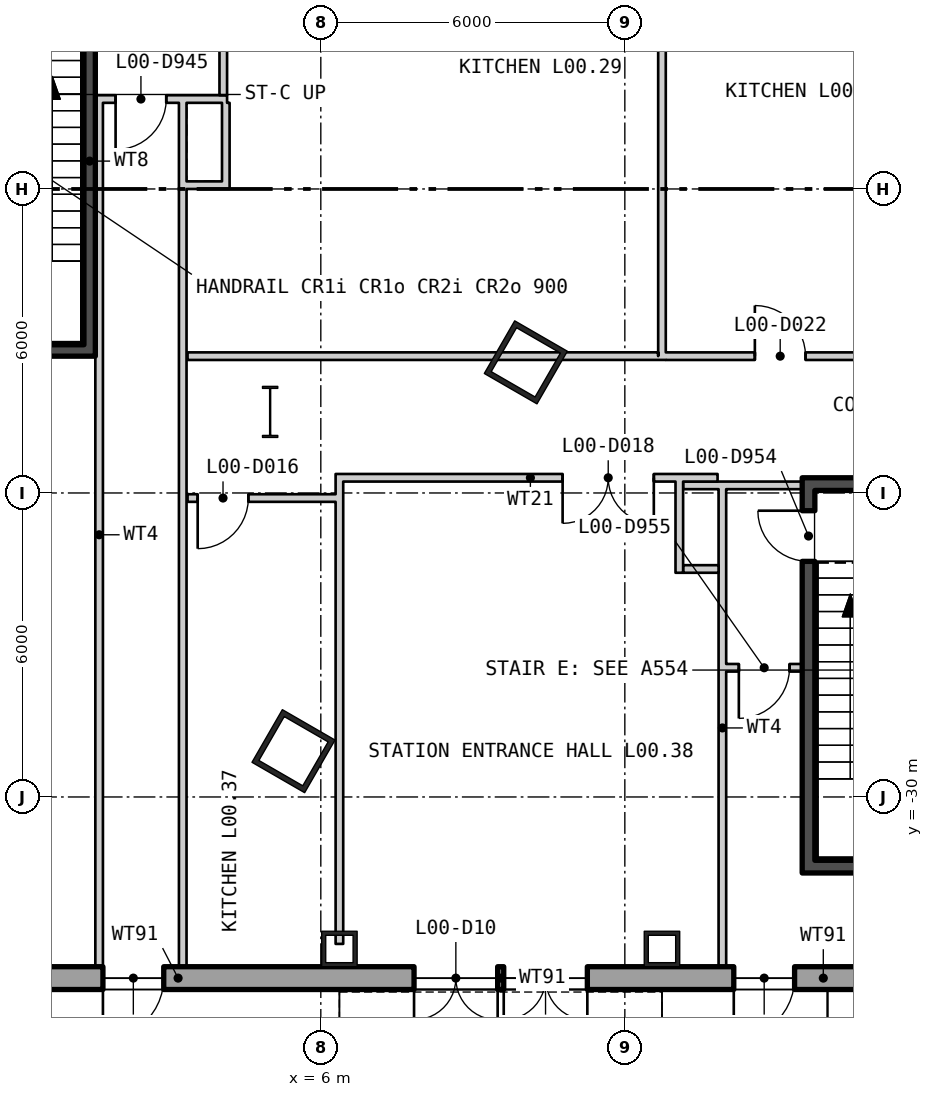
"""IFC4 building model, lengths in metres.
Left out: names, types, materials, properties, quantities, classifications, styles, units other than length and angle.
Written with IfcOpenShell. Run it as: python <this file> out.ifc"""

import sys

from ifc_helpers import new_model, si_unit, direction, frame, frame_2d, origin, origin_2d, place, context, subcontext, project, spatial, polyline, rectangle, hollow_rectangle, i_section, outline, extrude, element, fill, save


model = new_model("IFC4")
c1 = context("Model", 3, precision=1e-05, world=origin(), true_north=direction((0.0, 1.0)))
c2 = subcontext(c1, "Body", "Model", "MODEL_VIEW")
j1 = project(units=[si_unit("LENGTHUNIT", "METRE"), si_unit("PLANEANGLEUNIT", "RADIAN")], contexts=[c1])
p1 = place(None, origin())
s1 = spatial("IfcSite", under=j1, at=p1, CompositionType="ELEMENT")
p2 = place(p1, origin())
s2 = spatial("IfcBuilding", under=s1, at=p2, CompositionType="ELEMENT")
p3 = place(p2, origin())
s3 = spatial("IfcBuildingStorey", under=s2, at=p3, CompositionType="ELEMENT", Elevation=0.0)
for number, where, z_axis, x_axis in (
    (1, (5.461, -29.096, 0.0), (0.0, 0.0, 1.0), (0.5, 0.866, 0.0)),
    (2, (10.046, -21.422, 0.0), (0.0, 0.0, 1.0), (0.5, 0.866, 0.0)),
):
    element("IfcColumn", number, at=place(p3, frame(where, z_axis=z_axis, x_axis=x_axis)), inside=s3, PredefinedType="COLUMN", context=c2, shape_type="SweptSolid", body=[
        extrude(hollow_rectangle(XDim=1.2, YDim=1.2, WallThickness=0.1, at=origin_2d()), origin(), (0.0, 0.0, 1.0), 8.4),
    ])
p4 = place(p3, frame((5.0, -22.4, 0.0), z_axis=(0.0, 0.0, 1.0), x_axis=(1.0, 0.0, 0.0)))
e3 = element("IfcColumn", 3, at=p4, inside=s3, PredefinedType="COLUMN", context=c2, shape_type="SweptSolid", body=[
    extrude(i_section(OverallWidth=0.302, OverallDepth=1.008, WebThickness=0.021, FlangeThickness=0.04, at=origin_2d()), origin(), (0.0, 0.0, 1.0), 8.4),
])
for number, where, z_axis, x_axis in (
    (4, (6.367, -33.0, 0.0), (0.0, 0.0, 1.0), (1.0, 0.0, 0.0)),
    (5, (12.733, -33.0, 0.0), (0.0, 0.0, 1.0), (1.0, 0.0, 0.0)),
):
    element("IfcColumn", number, at=place(p3, frame(where, z_axis=z_axis, x_axis=x_axis)), inside=s3, PredefinedType="COLUMN", context=c2, shape_type="SweptSolid", body=[
        extrude(hollow_rectangle(XDim=0.7, YDim=0.7, WallThickness=0.08, at=origin_2d()), origin(), (0.0, 0.0, 1.0), 8.4),
    ])
p5 = place(p3, frame((-38.775, -33.575, 5.4), z_axis=(0.0, 0.0, 1.0), x_axis=(1.0, 0.0, 0.0)))
e6 = element("IfcWall", 6, at=p5, inside=s3, PredefinedType="SOLIDWALL", context=c2, shape_type="SweptSolid", body=[
    extrude(outline(polyline([(-0.225, -0.225), (77.775, -0.225), (77.325, 0.225), (0.225, 0.225), (-0.225, -0.225)])), origin(), (0.0, 0.0, 1.0), 2.6),
])
for number, where, z_axis, x_axis in (
    (7, (5.767, -33.575, -0.4), (0.0, 0.0, 1.0), (1.0, 0.0, 0.0)),
    (8, (12.133, -33.575, -0.4), (0.0, 0.0, 1.0), (1.0, 0.0, 0.0)),
):
    element("IfcWall", number, at=place(p3, frame(where, z_axis=z_axis, x_axis=x_axis)), inside=s3, PredefinedType="SOLIDWALL", context=c2, shape_type="SweptSolid", body=[
        extrude(outline(polyline([(0.0, -0.225), (1.2, -0.225), (1.2, 0.225), (0.0, 0.225), (0.0, -0.225)])), origin(), (0.0, 0.0, 1.0), 5.51),
    ])
p6 = place(p3, frame((0.6, -33.575, -0.4), z_axis=(0.0, 0.0, 1.0), x_axis=(1.0, 0.0, 0.0)))
e9 = element("IfcWall", 9, at=p6, inside=s3, PredefinedType="SOLIDWALL", context=c2, shape_type="SweptSolid", body=[
    extrude(outline(polyline([(0.0, -0.225), (5.167, -0.225), (5.167, 0.225), (0.0, 0.225), (0.0, -0.225)])), origin(), (0.0, 0.0, 1.0), 5.8),
])
p7 = place(p6, frame((1.1, 0.0, 0.4)))
e10 = element("IfcOpeningElement", 10, at=p7, cuts=e9, PredefinedType="OPENING", context=c2, shape_type="SweptSolid", body=[
    extrude(rectangle(XDim=1.2, YDim=2.4, at=frame_2d((0.6, 1.2))), frame((0.0, 0.235, 0.0), z_axis=(0.0, -1.0, 0.0), x_axis=(1.0, 0.0, 0.0)), (0.0, 0.0, 1.0), 0.47),
])
p8 = place(p3, frame((6.967, -33.575, -0.4), z_axis=(0.0, 0.0, 1.0), x_axis=(1.0, 0.0, 0.0)))
e11 = element("IfcWall", 11, at=p8, inside=s3, PredefinedType="SOLIDWALL", context=c2, shape_type="SweptSolid", body=[
    extrude(outline(polyline([(0.0, -0.225), (5.167, -0.225), (5.167, 0.225), (0.0, 0.225), (0.0, -0.225)])), origin(), (0.0, 0.0, 1.0), 5.8),
])
p9 = place(p8, frame((0.873, 0.0, 0.4)))
e12 = element("IfcOpeningElement", 12, at=p9, cuts=e11, PredefinedType="OPENING", context=c2, shape_type="SweptSolid", body=[
    extrude(rectangle(XDim=1.65, YDim=3.0, at=frame_2d((0.825, 1.5))), frame((0.0, 0.235, 0.0), z_axis=(0.0, -1.0, 0.0), x_axis=(1.0, 0.0, 0.0)), (0.0, 0.0, 1.0), 0.47),
])
p10 = place(p8, frame((2.643, 0.0, 0.4)))
e13 = element("IfcOpeningElement", 13, at=p10, cuts=e11, PredefinedType="OPENING", context=c2, shape_type="SweptSolid", body=[
    extrude(rectangle(XDim=1.65, YDim=3.0, at=frame_2d((0.825, 1.5))), frame((0.0, 0.235, 0.0), z_axis=(0.0, -1.0, 0.0), x_axis=(1.0, 0.0, 0.0)), (0.0, 0.0, 1.0), 0.47),
])
p11 = place(p3, frame((13.333, -33.575, -0.4), z_axis=(0.0, 0.0, 1.0), x_axis=(1.0, 0.0, 0.0)))
e14 = element("IfcWall", 14, at=p11, inside=s3, PredefinedType="SOLIDWALL", context=c2, shape_type="SweptSolid", body=[
    extrude(outline(polyline([(0.0, -0.225), (5.167, -0.225), (5.167, 0.225), (0.0, 0.225), (0.0, -0.225)])), origin(), (0.0, 0.0, 1.0), 5.8),
])
p12 = place(p11, frame((0.817, 0.0, 0.4)))
e15 = element("IfcOpeningElement", 15, at=p12, cuts=e14, PredefinedType="OPENING", context=c2, shape_type="SweptSolid", body=[
    extrude(rectangle(XDim=1.2, YDim=2.4, at=frame_2d((0.6, 1.2))), frame((0.0, 0.235, 0.0), z_axis=(0.0, -1.0, 0.0), x_axis=(1.0, 0.0, 0.0)), (0.0, 0.0, 1.0), 0.47),
])
p13 = place(p3, frame((1.438, -21.075, 0.0), z_axis=(0.0, 0.0, 1.0), x_axis=(0.0, 1.0, 0.0)))
e16 = element("IfcWall", 16, at=p13, inside=s3, PredefinedType="SHEAR", context=c2, shape_type="SweptSolid", body=[
    extrude(rectangle(XDim=7.25, YDim=0.225, at=frame_2d((3.625, 0.0))), origin(), (0.0, 0.0, 1.0), 8.18),
])
p14 = place(p13, frame((5.94, 0.0, 0.0)))
e17 = element("IfcOpeningElement", 17, at=p14, cuts=e16, PredefinedType="OPENING", context=c2, shape_type="SweptSolid", body=[
    extrude(rectangle(XDim=1.0, YDim=2.1, at=frame_2d((0.5, 1.05))), frame((0.0, 0.122, 0.0), z_axis=(0.0, -1.0, 0.0), x_axis=(1.0, 0.0, 0.0)), (0.0, 0.0, 1.0), 0.245),
])
p15 = place(p3, frame((-1.55, -21.188, 0.0), z_axis=(0.0, 0.0, 1.0), x_axis=(1.0, 0.0, 0.0)))
e18 = element("IfcWall", 18, at=p15, inside=s3, PredefinedType="SHEAR", context=c2, shape_type="SweptSolid", body=[
    extrude(rectangle(XDim=3.1, YDim=0.225, at=frame_2d((1.55, 0.0))), origin(), (0.0, 0.0, 1.0), 8.18),
])
p16 = place(p3, frame((1.55, -16.225, 0.0), z_axis=(0.0, 0.0, 1.0), x_axis=(1.0, 0.0, 0.0)))
e19 = element("IfcWall", 19, at=p16, inside=s3, PredefinedType="PARTITIONING", context=c2, shape_type="SweptSolid", body=[
    extrude(rectangle(XDim=2.6, YDim=0.15, at=frame_2d((1.3, 0.0))), origin(), (0.0, 0.0, 1.0), 8.18),
])
p17 = place(p16, frame((0.4, 0.0, 0.0)))
e20 = element("IfcOpeningElement", 20, at=p17, cuts=e19, PredefinedType="OPENING", context=c2, shape_type="SweptSolid", body=[
    extrude(rectangle(XDim=1.0, YDim=2.4, at=frame_2d((0.5, 1.2))), frame((0.0, 0.085, 0.0), z_axis=(0.0, -1.0, 0.0), x_axis=(1.0, 0.0, 0.0)), (0.0, 0.0, 1.0), 0.17),
])
p18 = place(p3, frame((4.075, -16.15, 0.0), z_axis=(0.0, 0.0, 1.0), x_axis=(0.0, 1.0, 0.0)))
e21 = element("IfcWall", 21, at=p18, inside=s3, PredefinedType="PARTITIONING", context=c2, shape_type="SweptSolid", body=[
    extrude(rectangle(XDim=2.4, YDim=0.15, at=frame_2d((1.2, 0.0))), origin(), (0.0, 0.0, 1.0), 8.18),
])
p19 = place(p3, frame((3.35, -17.925, 0.0), z_axis=(0.0, 0.0, 1.0), x_axis=(1.0, 0.0, 0.0)))
e22 = element("IfcWall", 22, at=p19, inside=s3, PredefinedType="PARTITIONING", context=c2, shape_type="SweptSolid", body=[
    extrude(rectangle(XDim=0.7, YDim=0.15, at=frame_2d((0.35, 0.0))), origin(), (0.0, 0.0, 1.0), 8.18),
])
p20 = place(p3, frame((4.125, -18.0, 0.0), z_axis=(0.0, 0.0, 1.0), x_axis=(0.0, 1.0, 0.0)))
e23 = element("IfcWall", 23, at=p20, inside=s3, PredefinedType="PARTITIONING", context=c2, shape_type="SweptSolid", body=[
    extrude(rectangle(XDim=1.7, YDim=0.15, at=frame_2d((0.85, 0.0))), origin(), (0.0, 0.0, 1.0), 8.18),
])
p21 = place(p3, frame((1.625, -33.35, 0.0), z_axis=(0.0, 0.0, 1.0), x_axis=(0.0, 1.0, 0.0)))
e24 = element("IfcWall", 24, at=p21, inside=s3, PredefinedType="PARTITIONING", context=c2, shape_type="SweptSolid", body=[
    extrude(rectangle(XDim=17.05, YDim=0.15, at=frame_2d((8.525, 0.0))), origin(), (0.0, 0.0, 1.0), 8.18),
])
p22 = place(p3, frame((3.275, -33.35, 0.0), z_axis=(0.0, 0.0, 1.0), x_axis=(0.0, 1.0, 0.0)))
e25 = element("IfcWall", 25, at=p22, inside=s3, PredefinedType="PARTITIONING", context=c2, shape_type="SweptSolid", body=[
    extrude(rectangle(XDim=0.45, YDim=0.15, at=frame_2d((0.225, 0.0))), origin(), (0.0, 0.0, 1.0), 8.18),
])
p23 = place(p3, frame((3.275, -32.9, 0.0), z_axis=(0.0, 0.0, 1.0), x_axis=(0.0, 1.0, 0.0)))
e26 = element("IfcWall", 26, at=p23, inside=s3, PredefinedType="PARTITIONING", context=c2, shape_type="SweptSolid", body=[
    extrude(rectangle(XDim=16.6, YDim=0.15, at=frame_2d((8.3, 0.0))), origin(), (0.0, 0.0, 1.0), 7.58),
])
p24 = place(p3, frame((15.625, -31.25, 0.0), z_axis=(0.0, 0.0, 1.0), x_axis=(0.0, 1.0, 0.0)))
e27 = element("IfcWall", 27, at=p24, inside=s3, PredefinedType="SHEAR", context=c2, shape_type="SweptSolid", body=[
    extrude(rectangle(XDim=7.3, YDim=0.25, at=frame_2d((3.65, 0.0))), origin(), (0.0, 0.0, 1.0), 8.18),
])
p25 = place(p24, frame((5.9, 0.0, 0.0)))
e28 = element("IfcOpeningElement", 28, at=p25, cuts=e27, PredefinedType="OPENING", context=c2, shape_type="SweptSolid", body=[
    extrude(rectangle(XDim=1.0, YDim=2.1, at=frame_2d((0.5, 1.05))), frame((0.0, 0.135, 0.0), z_axis=(0.0, -1.0, 0.0), x_axis=(1.0, 0.0, 0.0)), (0.0, 0.0, 1.0), 0.27),
])
for number, where, z_axis, x_axis in (
    (29, (15.5, -31.375, 0.0), (0.0, 0.0, 1.0), (1.0, 0.0, 0.0)),
    (30, (15.5, -23.825, 0.0), (0.0, 0.0, 1.0), (1.0, 0.0, 0.0)),
):
    element("IfcWall", number, at=place(p3, frame(where, z_axis=z_axis, x_axis=x_axis)), inside=s3, PredefinedType="SHEAR", context=c2, shape_type="SweptSolid", body=[
        extrude(rectangle(XDim=3.5, YDim=0.25, at=frame_2d((1.75, 0.0))), origin(), (0.0, 0.0, 1.0), 8.18),
    ])
p26 = place(p3, frame((13.925, -33.35, 0.0), z_axis=(0.0, 0.0, 1.0), x_axis=(0.0, 1.0, 0.0)))
e31 = element("IfcWall", 31, at=p26, inside=s3, PredefinedType="PARTITIONING", context=c2, shape_type="SweptSolid", body=[
    extrude(rectangle(XDim=9.425, YDim=0.15, at=frame_2d((4.713, 0.0))), origin(), (0.0, 0.0, 1.0), 8.18),
])
p27 = place(p3, frame((15.5, -23.85, 0.0), z_axis=(0.0, 0.0, 1.0), x_axis=(-1.0, 0.0, 0.0)))
e32 = element("IfcWall", 32, at=p27, inside=s3, PredefinedType="PARTITIONING", context=c2, shape_type="SweptSolid", body=[
    extrude(rectangle(XDim=2.35, YDim=0.15, at=frame_2d((1.175, 0.0))), origin(), (0.0, 0.0, 1.0), 8.18),
])
p28 = place(p3, frame((14.0, -27.45, 0.0), z_axis=(0.0, 0.0, 1.0), x_axis=(1.0, 0.0, 0.0)))
e33 = element("IfcWall", 33, at=p28, inside=s3, PredefinedType="PARTITIONING", context=c2, shape_type="SweptSolid", body=[
    extrude(rectangle(XDim=1.5, YDim=0.15, at=frame_2d((0.75, 0.0))), origin(), (0.0, 0.0, 1.0), 8.18),
])
p29 = place(p28, frame((0.25, 0.0, 0.0)))
e34 = element("IfcOpeningElement", 34, at=p29, cuts=e33, PredefinedType="OPENING", context=c2, shape_type="SweptSolid", body=[
    extrude(rectangle(XDim=1.0, YDim=2.1, at=frame_2d((0.5, 1.05))), frame((0.0, 0.085, 0.0), z_axis=(0.0, -1.0, 0.0), x_axis=(1.0, 0.0, 0.0)), (0.0, 0.0, 1.0), 0.17),
])
p30 = place(p3, frame((13.075, -25.575, 0.0), z_axis=(0.0, 0.0, 1.0), x_axis=(0.0, 1.0, 0.0)))
e35 = element("IfcWall", 35, at=p30, inside=s3, PredefinedType="PARTITIONING", context=c2, shape_type="SweptSolid", body=[
    extrude(rectangle(XDim=1.8, YDim=0.15, at=frame_2d((0.9, 0.0))), origin(), (0.0, 0.0, 1.0), 8.18),
])
p31 = place(p3, frame((13.85, -25.5, 0.0), z_axis=(0.0, 0.0, 1.0), x_axis=(-1.0, 0.0, 0.0)))
e36 = element("IfcWall", 36, at=p31, inside=s3, PredefinedType="PARTITIONING", context=c2, shape_type="SweptSolid", body=[
    extrude(rectangle(XDim=0.7, YDim=0.15, at=frame_2d((0.35, 0.0))), origin(), (0.0, 0.0, 1.0), 8.18),
])
p32 = place(p3, frame((3.37, -24.1, 0.0), z_axis=(0.0, 0.0, 1.0), x_axis=(1.0, 0.0, 0.0)))
e37 = element("IfcWall", 37, at=p32, inside=s3, PredefinedType="PARTITIONING", context=c2, shape_type="SweptSolid", body=[
    extrude(rectangle(XDim=2.922, YDim=0.15, at=frame_2d((1.461, 0.0))), origin(), (0.0, 0.0, 1.0), 8.18),
])
p33 = place(p32, frame((0.2, 0.0, 0.0)))
e38 = element("IfcOpeningElement", 38, at=p33, cuts=e37, PredefinedType="OPENING", context=c2, shape_type="SweptSolid", body=[
    extrude(rectangle(XDim=1.0, YDim=2.1, at=frame_2d((0.5, 1.05))), frame((0.0, 0.085, 0.0), z_axis=(0.0, -1.0, 0.0), x_axis=(1.0, 0.0, 0.0)), (0.0, 0.0, 1.0), 0.17),
])
p34 = place(p3, frame((3.37, -21.3, 0.0), z_axis=(0.0, 0.0, 1.0), x_axis=(0.999999994204, 0.000107665805, 0.0)))
e39 = element("IfcWall", 39, at=p34, inside=s3, PredefinedType="PARTITIONING", context=c2, shape_type="SweptSolid", body=[
    extrude(rectangle(XDim=9.288, YDim=0.15, at=frame_2d((4.644, 0.0))), origin(), (0.0, 0.0, 1.0), 8.18),
])
p35 = place(p3, frame((6.367, -32.9, 0.0), z_axis=(0.0, 0.0, 1.0), x_axis=(0.0, 1.0, 0.0)))
e40 = element("IfcWall", 40, at=p35, inside=s3, PredefinedType="PARTITIONING", context=c2, shape_type="SweptSolid", body=[
    extrude(rectangle(XDim=5.124, YDim=0.15, at=frame_2d((2.562, 0.0))), origin(), (0.0, 0.0, 1.0), 7.58),
])
p36 = place(p3, frame((6.367, -27.776, 0.0), z_axis=(0.0, 0.0, 1.0), x_axis=(0.0, 1.0, 0.0)))
e41 = element("IfcWall", 41, at=p36, inside=s3, PredefinedType="PARTITIONING", context=c2, shape_type="SweptSolid", body=[
    extrude(rectangle(XDim=0.39, YDim=0.15, at=frame_2d((0.195, 0.0))), origin(), (0.0, 0.0, 1.0), 8.18),
])
p37 = place(p3, frame((6.367, -27.386, 0.0), z_axis=(0.0, 0.0, 1.0), x_axis=(0.0, 1.0, 0.0)))
e42 = element("IfcWall", 42, at=p37, inside=s3, PredefinedType="PARTITIONING", context=c2, shape_type="SweptSolid", body=[
    extrude(rectangle(XDim=3.761, YDim=0.15, at=frame_2d((1.881, 0.0))), origin(), (0.0, 0.0, 1.0), 7.58),
])
p38 = place(p3, frame((6.442, -23.7, 0.0), z_axis=(0.0, 0.0, 1.0), x_axis=(1.0, 0.0, 0.0)))
e43 = element("IfcWall", 43, at=p38, inside=s3, PredefinedType="PARTITIONING", context=c2, shape_type="SweptSolid", body=[
    extrude(rectangle(XDim=7.388, YDim=0.15, at=frame_2d((3.694, 0.0))), origin(), (0.0, 0.0, 1.0), 8.18),
])
p39 = place(p38, frame((4.33, 0.0, 0.0)))
e44 = element("IfcOpeningElement", 44, at=p39, cuts=e43, PredefinedType="OPENING", context=c2, shape_type="SweptSolid", body=[
    extrude(rectangle(XDim=1.8, YDim=2.1, at=frame_2d((0.9, 1.05))), frame((0.0, 0.085, 0.0), z_axis=(0.0, -1.0, 0.0), x_axis=(1.0, 0.0, 0.0)), (0.0, 0.0, 1.0), 0.17),
])
p40 = place(p3, frame((12.733, -21.374, 0.0), z_axis=(0.0, 0.0, 1.0), x_axis=(0.0, 1.0, 0.0)))
e45 = element("IfcWall", 45, at=p40, inside=s3, PredefinedType="PARTITIONING", context=c2, shape_type="SweptSolid", body=[
    extrude(rectangle(XDim=1.575, YDim=0.15, at=frame_2d((0.787, 0.0))), origin(), (0.0, 0.0, 1.0), 7.49),
])
p41 = place(p3, frame((12.733, -19.799, 0.0), z_axis=(0.0, 0.0, 1.0), x_axis=(0.0, 1.0, 0.0)))
e46 = element("IfcWall", 46, at=p41, inside=s3, PredefinedType="PARTITIONING", context=c2, shape_type="SweptSolid", body=[
    extrude(rectangle(XDim=2.832, YDim=0.15, at=frame_2d((1.416, 0.0))), origin(), (0.0, 0.0, 1.0), 7.58),
])
p42 = place(p3, frame((12.733, -16.967, 0.0), z_axis=(0.0, 0.0, 1.0), x_axis=(0.0, 1.0, 0.0)))
e47 = element("IfcWall", 47, at=p42, inside=s3, PredefinedType="PARTITIONING", context=c2, shape_type="SweptSolid", body=[
    extrude(rectangle(XDim=0.4, YDim=0.15, at=frame_2d((0.2, 0.0))), origin(), (0.0, 0.0, 1.0), 8.18),
])
p43 = place(p3, frame((12.733, -16.567, 0.0), z_axis=(0.0, 0.0, 1.0), x_axis=(0.0, 1.0, 0.0)))
e48 = element("IfcWall", 48, at=p43, inside=s3, PredefinedType="PARTITIONING", context=c2, shape_type="SweptSolid", body=[
    extrude(rectangle(XDim=2.717, YDim=0.15, at=frame_2d((1.359, 0.0))), origin(), (0.0, 0.0, 1.0), 7.58),
])
p44 = place(p3, frame((12.808, -21.3, 0.0), z_axis=(0.0, 0.0, 1.0), x_axis=(1.0, 0.0, 0.0)))
e49 = element("IfcWall", 49, at=p44, inside=s3, PredefinedType="PARTITIONING", context=c2, shape_type="SweptSolid", body=[
    extrude(rectangle(XDim=4.617, YDim=0.15, at=frame_2d((2.308, 0.0))), origin(), (0.0, 0.0, 1.0), 8.18),
])
p45 = place(p44, frame((1.758, 0.0, 0.0)))
e50 = element("IfcOpeningElement", 50, at=p45, cuts=e49, PredefinedType="OPENING", context=c2, shape_type="SweptSolid", body=[
    extrude(rectangle(XDim=1.0, YDim=2.1, at=frame_2d((0.5, 1.05))), frame((0.0, 0.085, 0.0), z_axis=(0.0, -1.0, 0.0), x_axis=(1.0, 0.0, 0.0)), (0.0, 0.0, 1.0), 0.17),
])
p46 = place(p7, frame((1.2, 0.0, 0.0), z_axis=(0.0, 0.0, 1.0), x_axis=(-1.0, 0.0, 0.0)))
e51 = element("IfcDoor", 51, at=p46, inside=s3, OperationType="SINGLE_SWING_LEFT", PredefinedType="DOOR", context=c2, shape_type="SweptSolid", body=[
    extrude(rectangle(XDim=1.2, YDim=2.4, at=frame_2d((0.6, 1.2))), frame((0.0, 0.025, 0.0), z_axis=(0.0, -1.0, 0.0), x_axis=(1.0, 0.0, 0.0)), (0.0, 0.0, 1.0), 0.05),
])
fill(e10, e51)
p47 = place(p9, frame((1.65, 0.0, 0.0), z_axis=(0.0, 0.0, 1.0), x_axis=(-1.0, 0.0, 0.0)))
e52 = element("IfcDoor", 52, at=p47, inside=s3, OperationType="DOUBLE_DOOR_DOUBLE_SWING", PredefinedType="DOOR", context=c2, shape_type="SweptSolid", body=[
    extrude(rectangle(XDim=1.65, YDim=3.0, at=frame_2d((0.825, 1.5))), frame((0.0, 0.025, 0.0), z_axis=(0.0, -1.0, 0.0), x_axis=(1.0, 0.0, 0.0)), (0.0, 0.0, 1.0), 0.05),
])
fill(e12, e52)
p48 = place(p10, frame((1.65, 0.0, 0.0), z_axis=(0.0, 0.0, 1.0), x_axis=(-1.0, 0.0, 0.0)))
e53 = element("IfcDoor", 53, at=p48, inside=s3, OperationType="DOUBLE_DOOR_DOUBLE_SWING", PredefinedType="DOOR", context=c2, shape_type="SweptSolid", body=[
    extrude(rectangle(XDim=1.65, YDim=3.0, at=frame_2d((0.825, 1.5))), frame((0.0, 0.025, 0.0), z_axis=(0.0, -1.0, 0.0), x_axis=(1.0, 0.0, 0.0)), (0.0, 0.0, 1.0), 0.05),
])
fill(e13, e53)
p49 = place(p12, frame((1.2, 0.0, 0.0), z_axis=(0.0, 0.0, 1.0), x_axis=(-1.0, 0.0, 0.0)))
e54 = element("IfcDoor", 54, at=p49, inside=s3, OperationType="SINGLE_SWING_LEFT", PredefinedType="DOOR", context=c2, shape_type="SweptSolid", body=[
    extrude(rectangle(XDim=1.2, YDim=2.4, at=frame_2d((0.6, 1.2))), frame((0.0, 0.025, 0.0), z_axis=(0.0, -1.0, 0.0), x_axis=(1.0, 0.0, 0.0)), (0.0, 0.0, 1.0), 0.05),
])
fill(e15, e54)
p50 = place(p17, origin())
e55 = element("IfcDoor", 55, at=p50, inside=s3, OperationType="SINGLE_SWING_LEFT", PredefinedType="DOOR", context=c2, shape_type="SweptSolid", body=[
    extrude(rectangle(XDim=1.0, YDim=2.4, at=frame_2d((0.5, 1.2))), frame((0.0, 0.025, 0.0), z_axis=(0.0, -1.0, 0.0), x_axis=(1.0, 0.0, 0.0)), (0.0, 0.0, 1.0), 0.05),
])
fill(e20, e55)
p51 = place(p25, origin())
e56 = element("IfcDoor", 56, at=p51, inside=s3, OperationType="SINGLE_SWING_LEFT", PredefinedType="DOOR", context=c2, shape_type="SweptSolid", body=[
    extrude(rectangle(XDim=1.0, YDim=2.1, at=frame_2d((0.5, 1.05))), frame((0.0, 0.025, 0.0), z_axis=(0.0, -1.0, 0.0), x_axis=(1.0, 0.0, 0.0)), (0.0, 0.0, 1.0), 0.05),
])
fill(e28, e56)
p52 = place(p29, origin())
e57 = element("IfcDoor", 57, at=p52, inside=s3, OperationType="SINGLE_SWING_LEFT", PredefinedType="DOOR", context=c2, shape_type="SweptSolid", body=[
    extrude(rectangle(XDim=1.0, YDim=2.1, at=frame_2d((0.5, 1.05))), frame((0.0, 0.025, 0.0), z_axis=(0.0, -1.0, 0.0), x_axis=(1.0, 0.0, 0.0)), (0.0, 0.0, 1.0), 0.05),
])
fill(e34, e57)
p53 = place(p33, origin())
e58 = element("IfcDoor", 58, at=p53, inside=s3, OperationType="SINGLE_SWING_LEFT", PredefinedType="DOOR", context=c2, shape_type="SweptSolid", body=[
    extrude(rectangle(XDim=1.0, YDim=2.1, at=frame_2d((0.5, 1.05))), frame((0.0, 0.025, 0.0), z_axis=(0.0, -1.0, 0.0), x_axis=(1.0, 0.0, 0.0)), (0.0, 0.0, 1.0), 0.05),
])
fill(e38, e58)
p54 = place(p39, origin())
e59 = element("IfcDoor", 59, at=p54, inside=s3, OperationType="DOUBLE_DOOR_SINGLE_SWING", PredefinedType="DOOR", context=c2, shape_type="SweptSolid", body=[
    extrude(rectangle(XDim=1.8, YDim=2.1, at=frame_2d((0.9, 1.05))), frame((0.0, 0.025, 0.0), z_axis=(0.0, -1.0, 0.0), x_axis=(1.0, 0.0, 0.0)), (0.0, 0.0, 1.0), 0.05),
])
fill(e44, e59)
p55 = place(p45, origin())
e60 = element("IfcDoor", 60, at=p55, inside=s3, OperationType="SINGLE_SWING_RIGHT", PredefinedType="DOOR", context=c2, shape_type="SweptSolid", body=[
    extrude(rectangle(XDim=1.0, YDim=2.1, at=frame_2d((0.5, 1.05))), frame((0.0, 0.025, 0.0), z_axis=(0.0, -1.0, 0.0), x_axis=(1.0, 0.0, 0.0)), (0.0, 0.0, 1.0), 0.05),
])
fill(e50, e60)
save(model, sys.argv[1])
